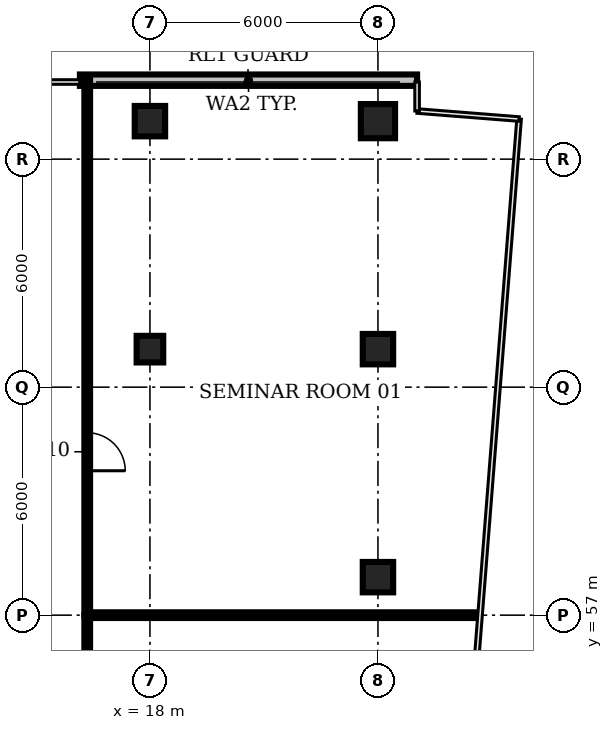
"""IFC4 building model, lengths in metres.
Left out: names, types, materials, properties, quantities, classifications, styles, units other than length and angle.
Written with IfcOpenShell. Run it as: python <this file> out.ifc"""

import sys

from ifc_helpers import new_model, si_unit, direction, frame, frame_2d, origin, origin_2d, place, context, subcontext, project, spatial, rectangle, circle, extrude, element, fill, save


model = new_model("IFC4")
c1 = context("Model", 3, precision=1e-05, world=origin(), true_north=direction((0.0, 1.0)))
c2 = subcontext(c1, "Body", "Model", "MODEL_VIEW")
j1 = project(units=[si_unit("LENGTHUNIT", "METRE"), si_unit("PLANEANGLEUNIT", "RADIAN")], contexts=[c1])
p1 = place(None, origin())
s1 = spatial("IfcSite", under=j1, at=p1, CompositionType="ELEMENT")
p2 = place(p1, origin())
s2 = spatial("IfcBuilding", under=s1, at=p2, CompositionType="ELEMENT")
p3 = place(p2, frame((0.0, 0.0, 247.4)))
s3 = spatial("IfcBuildingStorey", under=s2, at=p3, CompositionType="ELEMENT", Elevation=247.4)
p4 = place(p3, frame((18.0, 64.0, 0.0), z_axis=(0.0, 0.0, 1.0), x_axis=(1.0, 0.0, 0.0)))
e1 = element("IfcColumn", 1, at=p4, inside=s3, PredefinedType="COLUMN", context=c2, shape_type="SweptSolid", body=[
    extrude(rectangle(XDim=0.7, YDim=0.7, at=origin_2d()), origin(), (0.0, 0.0, 1.0), 3.85),
])
for number, where, z_axis, x_axis in (
    (2, (18.0, 70.0, 0.0), (0.0, 0.0, 1.0), (1.0, 0.0, 0.0)),
    (3, (24.0, 58.0, 0.0), (0.0, 0.0, 1.0), (1.0, 0.0, 0.0)),
    (4, (24.0, 64.0, 0.0), (0.0, 0.0, 1.0), (1.0, 0.0, 0.0)),
):
    element("IfcColumn", number, at=place(p3, frame(where, z_axis=z_axis, x_axis=x_axis)), inside=s3, PredefinedType="COLUMN", context=c2, shape_type="SweptSolid", body=[
        extrude(rectangle(XDim=0.8, YDim=0.8, at=origin_2d()), origin(), (0.0, 0.0, 1.0), 3.85),
    ])
p5 = place(p3, frame((24.0, 70.0, 0.0), z_axis=(0.0, 0.0, 1.0), x_axis=(1.0, 0.0, 0.0)))
e5 = element("IfcColumn", 5, at=p5, inside=s3, PredefinedType="COLUMN", context=c2, shape_type="SweptSolid", body=[
    extrude(circle(Radius=0.45, at=origin_2d()), origin(), (0.0, 0.0, 1.0), 3.85),
])
p6 = place(p3, frame((25.03, 71.078, 0.0), z_axis=(0.0, 0.0, 1.0), x_axis=(-1.0, 0.0, 0.0)))
e6 = element("IfcWall", 6, at=p6, inside=s3, PredefinedType="SOLIDWALL", context=c2, shape_type="SweptSolid", body=[
    extrude(rectangle(XDim=8.873, YDim=0.3, at=frame_2d((4.436, 0.0))), origin(), (0.0, 0.0, 1.0), 3.85),
])
p7 = place(p3, frame((16.35, 57.0, 0.0), z_axis=(0.0, 0.0, 1.0), x_axis=(0.0, -1.0, 0.0)))
e7 = element("IfcWall", 7, at=p7, inside=s3, PredefinedType="PARTITIONING", context=c2, shape_type="SweptSolid", body=[
    extrude(rectangle(XDim=6.0, YDim=0.15, at=frame_2d((3.0, 0.0))), origin(), (0.0, 0.0, 1.0), 2.88),
])
p8 = place(p7, frame((1.8, 0.0, 0.0)))
e8 = element("IfcOpeningElement", 8, at=p8, cuts=e7, PredefinedType="OPENING", context=c2, shape_type="SweptSolid", body=[
    extrude(rectangle(XDim=1.0, YDim=2.1, at=frame_2d((0.5, 1.05))), frame((0.0, 0.085, 0.0), z_axis=(0.0, -1.0, 0.0), x_axis=(1.0, 0.0, 0.0)), (0.0, 0.0, 1.0), 0.17),
])
p9 = place(p3, frame((16.35, 57.0, 0.0), z_axis=(0.0, 0.0, 1.0), x_axis=(1.0, 0.0, 0.0)))
e9 = element("IfcWall", 9, at=p9, inside=s3, PredefinedType="PARTITIONING", context=c2, shape_type="SweptSolid", body=[
    extrude(rectangle(XDim=10.29, YDim=0.15, at=frame_2d((5.145, 0.0))), origin(), (0.0, 0.0, 1.0), 2.88),
])
p10 = place(p3, frame((16.35, 71.09, 0.0), z_axis=(0.0, 0.0, 1.0), x_axis=(0.0, -1.0, 0.0)))
e10 = element("IfcWall", 10, at=p10, inside=s3, PredefinedType="PARTITIONING", context=c2, shape_type="SweptSolid", body=[
    extrude(rectangle(XDim=14.09, YDim=0.15, at=frame_2d((7.045, 0.0))), origin(), (0.0, 0.0, 1.0), 2.88),
])
p11 = place(p10, frame((9.29, 0.0, 0.0)))
e11 = element("IfcOpeningElement", 11, at=p11, cuts=e10, PredefinedType="OPENING", context=c2, shape_type="SweptSolid", body=[
    extrude(rectangle(XDim=1.0, YDim=2.1, at=frame_2d((0.5, 1.05))), frame((0.0, 0.085, 0.0), z_axis=(0.0, -1.0, 0.0), x_axis=(1.0, 0.0, 0.0)), (0.0, 0.0, 1.0), 0.17),
])
p12 = place(p11, origin())
e12 = element("IfcDoor", 12, at=p12, inside=s3, OperationType="SINGLE_SWING_RIGHT", PredefinedType="DOOR", context=c2, shape_type="SweptSolid", body=[
    extrude(rectangle(XDim=1.0, YDim=2.1, at=frame_2d((0.5, 1.05))), frame((0.0, 0.025, 0.0), z_axis=(0.0, -1.0, 0.0), x_axis=(1.0, 0.0, 0.0)), (0.0, 0.0, 1.0), 0.05),
])
fill(e11, e12)
save(model, sys.argv[1])
